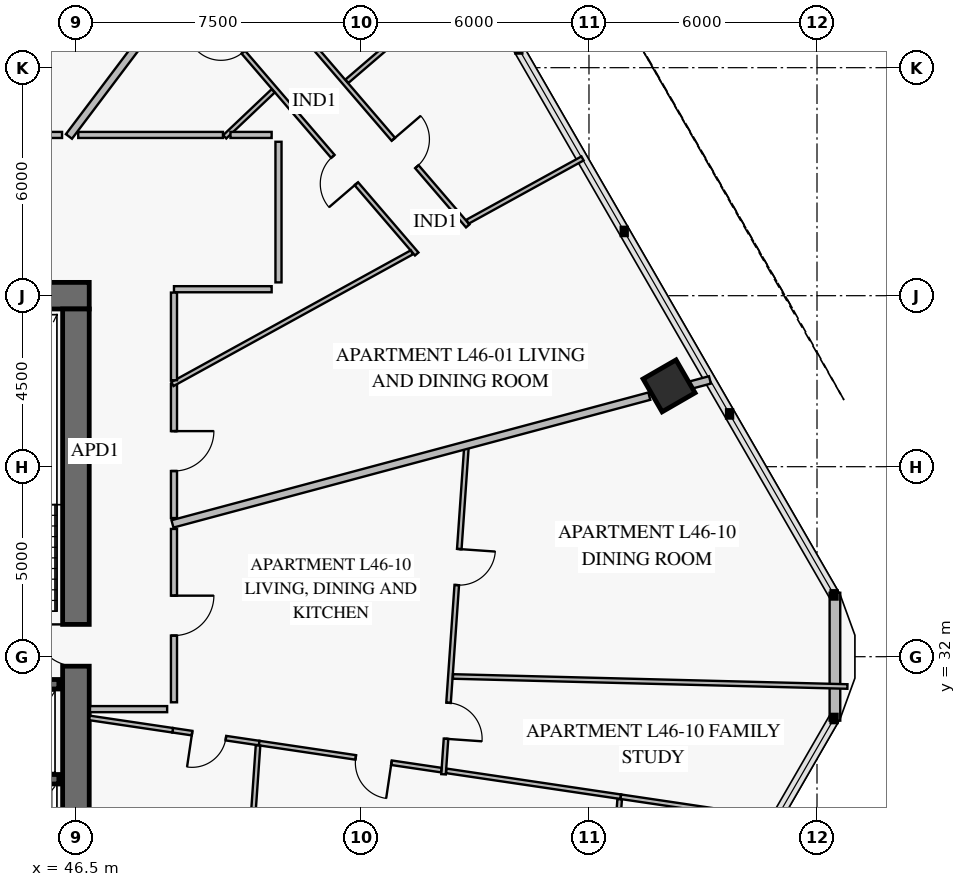
"""IFC4 building model, lengths in metres.
Left out: names, types, materials, properties, quantities, classifications, styles, units other than length and angle.
Written with IfcOpenShell. Run it as: python <this file> out.ifc"""

import sys

from ifc_helpers import new_model, si_unit, direction, frame, frame_2d, origin, origin_2d, place, context, subcontext, project, spatial, rectangle, extrude, element, fill, save


model = new_model("IFC4")
c1 = context("Model", 3, precision=1e-05, world=origin(), true_north=direction((0.0, 1.0)))
c2 = subcontext(c1, "Body", "Model", "MODEL_VIEW")
j1 = project(units=[si_unit("LENGTHUNIT", "METRE"), si_unit("PLANEANGLEUNIT", "RADIAN")], contexts=[c1])
p1 = place(None, origin())
s1 = spatial("IfcSite", under=j1, at=p1, CompositionType="ELEMENT")
p2 = place(p1, origin())
s2 = spatial("IfcBuilding", under=s1, at=p2, CompositionType="ELEMENT")
p3 = place(p2, frame((0.0, 0.0, 184.6)))
s3 = spatial("IfcBuildingStorey", under=s2, at=p3, CompositionType="ELEMENT", Elevation=184.6)
p4 = place(p3, frame((46.85, 41.5, 0.0), z_axis=(0.0, 0.0, 1.0), x_axis=(-1.0, 0.0, 0.0)))
e1 = element("IfcWall", 1, at=p4, inside=s3, PredefinedType="SHEAR", context=c2, shape_type="SweptSolid", body=[
    extrude(rectangle(XDim=7.9, YDim=0.7, at=frame_2d((3.95, 0.0))), origin(), (0.0, 0.0, 1.0), 3.8),
])
p5 = place(p3, frame((46.5, 22.85, 0.0), z_axis=(0.0, 0.0, 1.0), x_axis=(0.0, 1.0, 0.0)))
e2 = element("IfcWall", 2, at=p5, inside=s3, PredefinedType="SHEAR", context=c2, shape_type="SweptSolid", body=[
    extrude(rectangle(XDim=18.3, YDim=0.7, at=frame_2d((9.15, 0.0))), origin(), (0.0, 0.0, 1.0), 3.8),
])
p6 = place(p5, frame((8.9, 0.0, 0.0)))
e3 = element("IfcOpeningElement", 3, at=p6, cuts=e2, PredefinedType="OPENING", context=c2, shape_type="SweptSolid", body=[
    extrude(rectangle(XDim=1.1, YDim=2.15, at=frame_2d((0.55, 1.075))), frame((0.0, 0.362, 0.0), z_axis=(0.0, -1.0, 0.0), x_axis=(1.0, 0.0, 0.0)), (0.0, 0.0, 1.0), 0.724),
])
p7 = place(p3, frame((62.108, 39.126, 0.0), z_axis=(0.0, 0.0, 1.0), x_axis=(-0.5, 0.866025403784, 0.0)))
e4 = element("IfcColumn", 4, at=p7, inside=s3, PredefinedType="COLUMN", context=c2, shape_type="SweptSolid", body=[
    extrude(rectangle(XDim=1.0, YDim=1.0, at=origin_2d()), origin(), (0.0, 0.0, 1.0), 3.55),
])
p8 = place(p3, frame((66.472, 33.683, 0.0), z_axis=(0.0, 0.0, 1.0), x_axis=(0.0, -1.0, 0.0)))
e5 = element("IfcWall", 5, at=p8, inside=s3, PredefinedType="SOLIDWALL", context=c2, shape_type="SweptSolid", body=[
    extrude(rectangle(XDim=3.365, YDim=0.28, at=frame_2d((1.683, 0.0))), origin(), (0.0, 0.0, 1.0), 3.55),
])
p9 = place(p3, frame((25.95, 31.275, 0.0), z_axis=(0.0, 0.0, 1.0), x_axis=(1.0, 0.0, 0.0)))
e6 = element("IfcWall", 6, at=p9, inside=s3, PredefinedType="SOLIDWALL", context=c2, shape_type="SweptSolid", body=[
    extrude(rectangle(XDim=20.1, YDim=0.25, at=frame_2d((10.05, 0.0))), origin(), (0.0, 0.0, 1.0), 3.8),
])
p10 = place(p9, frame((2.6, 0.0, 0.0)))
e7 = element("IfcOpeningElement", 7, at=p10, cuts=e6, PredefinedType="OPENING", context=c2, shape_type="SweptSolid", body=[
    extrude(rectangle(XDim=1.1, YDim=2.15, at=frame_2d((0.55, 1.075))), frame((0.0, 0.137, 0.0), z_axis=(0.0, -1.0, 0.0), x_axis=(1.0, 0.0, 0.0)), (0.0, 0.0, 1.0), 0.274),
])
p11 = place(p9, frame((10.6, 0.0, 0.0)))
e8 = element("IfcOpeningElement", 8, at=p11, cuts=e6, PredefinedType="OPENING", context=c2, shape_type="SweptSolid", body=[
    extrude(rectangle(XDim=1.1, YDim=2.15, at=frame_2d((0.55, 1.075))), frame((0.0, 0.137, 0.0), z_axis=(0.0, -1.0, 0.0), x_axis=(1.0, 0.0, 0.0)), (0.0, 0.0, 1.0), 0.274),
])
p12 = place(p9, frame((16.35, 0.0, 0.0)))
e9 = element("IfcOpeningElement", 9, at=p12, cuts=e6, PredefinedType="OPENING", context=c2, shape_type="SweptSolid", body=[
    extrude(rectangle(XDim=1.1, YDim=2.15, at=frame_2d((0.55, 1.075))), frame((0.0, 0.137, 0.0), z_axis=(0.0, -1.0, 0.0), x_axis=(1.0, 0.0, 0.0)), (0.0, 0.0, 1.0), 0.274),
])
p13 = place(p3, frame((43.8, 28.775, 0.0), z_axis=(0.0, 0.0, 1.0), x_axis=(1.0, 0.0, 0.0)))
e10 = element("IfcWall", 10, at=p13, inside=s3, PredefinedType="SOLIDWALL", context=c2, shape_type="SweptSolid", body=[
    extrude(rectangle(XDim=2.25, YDim=0.25, at=frame_2d((1.125, 0.0))), origin(), (0.0, 0.0, 1.0), 3.8),
])
p14 = place(p3, frame((55.467, 42.597, 0.0), z_axis=(0.0, 0.0, 1.0), x_axis=(-0.651552756093, 0.758603325875, 0.0)))
e11 = element("IfcWall", 11, at=p14, inside=s3, PredefinedType="PARTITIONING", context=c2, shape_type="SweptSolid", body=[
    extrude(rectangle(XDim=9.291, YDim=0.12, at=frame_2d((4.646, 0.0))), origin(), (0.0, 0.0, 1.0), 2.9),
])
p15 = place(p14, frame((2.437, 0.0, 0.0)))
e12 = element("IfcOpeningElement", 12, at=p15, cuts=e11, PredefinedType="OPENING", context=c2, shape_type="SweptSolid", body=[
    extrude(rectangle(XDim=0.95, YDim=2.1, at=frame_2d((0.475, 1.05))), frame((0.0, 0.072, 0.0), z_axis=(0.0, -1.0, 0.0), x_axis=(1.0, 0.0, 0.0)), (0.0, 0.0, 1.0), 0.144),
])
p16 = place(p14, frame((7.005, 0.0, 0.0)))
e13 = element("IfcOpeningElement", 13, at=p16, cuts=e11, PredefinedType="OPENING", context=c2, shape_type="SweptSolid", body=[
    extrude(rectangle(XDim=0.9, YDim=2.1, at=frame_2d((0.45, 1.05))), frame((0.0, 0.072, 0.0), z_axis=(0.0, -1.0, 0.0), x_axis=(1.0, 0.0, 0.0)), (0.0, 0.0, 1.0), 0.144),
])
p17 = place(p3, frame((56.81, 43.336, 0.0), z_axis=(0.0, 0.0, 1.0), x_axis=(-0.651575392226, 0.75858388346, 0.0)))
e14 = element("IfcWall", 14, at=p17, inside=s3, PredefinedType="PARTITIONING", context=c2, shape_type="SweptSolid", body=[
    extrude(rectangle(XDim=9.92, YDim=0.12, at=frame_2d((4.96, 0.0))), origin(), (0.0, 0.0, 1.0), 2.9),
])
p18 = place(p17, frame((2.055, 0.0, 0.0)))
e15 = element("IfcOpeningElement", 15, at=p18, cuts=e14, PredefinedType="OPENING", context=c2, shape_type="SweptSolid", body=[
    extrude(rectangle(XDim=0.95, YDim=2.1, at=frame_2d((0.475, 1.05))), frame((0.0, 0.072, 0.0), z_axis=(0.0, -1.0, 0.0), x_axis=(1.0, 0.0, 0.0)), (0.0, 0.0, 1.0), 0.144),
])
p19 = place(p17, frame((6.915, 0.0, 0.0)))
e16 = element("IfcOpeningElement", 16, at=p19, cuts=e14, PredefinedType="OPENING", context=c2, shape_type="SweptSolid", body=[
    extrude(rectangle(XDim=0.95, YDim=2.1, at=frame_2d((0.475, 1.05))), frame((0.0, 0.072, 0.0), z_axis=(0.0, -1.0, 0.0), x_axis=(1.0, 0.0, 0.0)), (0.0, 0.0, 1.0), 0.144),
])
p20 = place(p3, frame((49.08, 35.648, 0.0), z_axis=(0.0, 0.0, 1.0), x_axis=(0.0, 1.0, 0.0)))
e17 = element("IfcWall", 17, at=p20, inside=s3, PredefinedType="PARTITIONING", context=c2, shape_type="SweptSolid", body=[
    extrude(rectangle(XDim=3.526, YDim=0.16, at=frame_2d((1.763, 0.0))), origin(), (0.0, 0.0, 1.0), 2.9),
])
p21 = place(p20, frame((1.238, 0.0, 0.0)))
e18 = element("IfcOpeningElement", 18, at=p21, cuts=e17, PredefinedType="OPENING", context=c2, shape_type="SweptSolid", body=[
    extrude(rectangle(XDim=1.05, YDim=2.15, at=frame_2d((0.525, 1.075))), frame((0.0, 0.092, 0.0), z_axis=(0.0, -1.0, 0.0), x_axis=(1.0, 0.0, 0.0)), (0.0, 0.0, 1.0), 0.184),
])
p22 = place(p3, frame((46.135, 45.73, 0.0), z_axis=(0.0, 0.0, 1.0), x_axis=(-1.0, 0.0, 0.0)))
e19 = element("IfcWall", 19, at=p22, inside=s3, PredefinedType="PARTITIONING", context=c2, shape_type="SweptSolid", body=[
    extrude(rectangle(XDim=4.234, YDim=0.16, at=frame_2d((2.117, 0.0))), origin(), (0.0, 0.0, 1.0), 3.55),
])
p23 = place(p22, frame((1.592, 0.0, 0.0)))
e20 = element("IfcOpeningElement", 20, at=p23, cuts=e19, PredefinedType="OPENING", context=c2, shape_type="SweptSolid", body=[
    extrude(rectangle(XDim=1.05, YDim=2.15, at=frame_2d((0.525, 1.075))), frame((0.0, 0.092, 0.0), z_axis=(0.0, -1.0, 0.0), x_axis=(1.0, 0.0, 0.0)), (0.0, 0.0, 1.0), 0.184),
])
p24 = place(p3, frame((56.173, 28.906, 0.0), z_axis=(0.0, 0.0, 1.0), x_axis=(0.069768607492, 0.997563201711, 0.0)))
e21 = element("IfcWall", 21, at=p24, inside=s3, PredefinedType="PARTITIONING", context=c2, shape_type="SweptSolid", body=[
    extrude(rectangle(XDim=8.591, YDim=0.12, at=frame_2d((4.295, 0.0))), origin(), (0.0, 0.0, 1.0), 3.55),
])
p25 = place(p24, frame((0.936, 0.0, 0.0)))
e22 = element("IfcOpeningElement", 22, at=p25, cuts=e21, PredefinedType="OPENING", context=c2, shape_type="SweptSolid", body=[
    extrude(rectangle(XDim=0.95, YDim=2.1, at=frame_2d((0.475, 1.05))), frame((0.0, 0.072, 0.0), z_axis=(0.0, -1.0, 0.0), x_axis=(1.0, 0.0, 0.0)), (0.0, 0.0, 1.0), 0.144),
])
p26 = place(p24, frame((4.991, 0.0, 0.0)))
e23 = element("IfcOpeningElement", 23, at=p26, cuts=e21, PredefinedType="OPENING", context=c2, shape_type="SweptSolid", body=[
    extrude(rectangle(XDim=0.95, YDim=2.1, at=frame_2d((0.475, 1.05))), frame((0.0, 0.072, 0.0), z_axis=(0.0, -1.0, 0.0), x_axis=(1.0, 0.0, 0.0)), (0.0, 0.0, 1.0), 0.144),
])
p27 = place(p3, frame((49.045, 30.064, 0.0), z_axis=(0.0, 0.0, 1.0), x_axis=(0.989173245812, -0.146752477897, 0.0)))
e24 = element("IfcWall", 24, at=p27, inside=s3, PredefinedType="PARTITIONING", context=c2, shape_type="SweptSolid", body=[
    extrude(rectangle(XDim=2.301, YDim=0.12, at=frame_2d((1.15, 0.0))), origin(), (0.0, 0.0, 1.0), 3.55),
])
p28 = place(p27, frame((0.516, 0.0, 0.0)))
e25 = element("IfcOpeningElement", 25, at=p28, cuts=e24, PredefinedType="OPENING", context=c2, shape_type="SweptSolid", body=[
    extrude(rectangle(XDim=0.9, YDim=2.1, at=frame_2d((0.45, 1.05))), frame((0.0, 0.072, 0.0), z_axis=(0.0, -1.0, 0.0), x_axis=(1.0, 0.0, 0.0)), (0.0, 0.0, 1.0), 0.144),
])
p29 = place(p3, frame((51.321, 29.727, 0.0), z_axis=(0.0, 0.0, 1.0), x_axis=(0.98916147346, -0.146831806573, 0.0)))
e26 = element("IfcWall", 26, at=p29, inside=s3, PredefinedType="PARTITIONING", context=c2, shape_type="SweptSolid", body=[
    extrude(rectangle(XDim=4.844, YDim=0.12, at=frame_2d((2.422, 0.0))), origin(), (0.0, 0.0, 1.0), 3.55),
])
p30 = place(p29, frame((2.569, 0.0, 0.0)))
e27 = element("IfcOpeningElement", 27, at=p30, cuts=e26, PredefinedType="OPENING", context=c2, shape_type="SweptSolid", body=[
    extrude(rectangle(XDim=0.95, YDim=2.1, at=frame_2d((0.475, 1.05))), frame((0.0, 0.072, 0.0), z_axis=(0.0, -1.0, 0.0), x_axis=(1.0, 0.0, 0.0)), (0.0, 0.0, 1.0), 0.144),
])
p31 = place(p3, frame((56.247, 28.996, 0.0), z_axis=(0.0, 0.0, 1.0), x_axis=(0.989173212218, -0.146752704339, 0.0)))
e28 = element("IfcWall", 28, at=p31, inside=s3, PredefinedType="PARTITIONING", context=c2, shape_type="SweptSolid", body=[
    extrude(rectangle(XDim=4.64, YDim=0.12, at=frame_2d((2.32, 0.0))), origin(), (0.0, 0.0, 1.0), 3.55),
])
p32 = place(p3, frame((60.356, 21.803, 0.0), z_axis=(0.0, 0.0, 1.0), x_axis=(0.069770485872, 0.997563070337, 0.0)))
e29 = element("IfcWall", 29, at=p32, inside=s3, PredefinedType="PARTITIONING", context=c2, shape_type="SweptSolid", body=[
    extrude(rectangle(XDim=6.463, YDim=0.12, at=frame_2d((3.231, 0.0))), origin(), (0.0, 0.0, 1.0), 2.87),
])
p33 = place(p32, frame((4.055, 0.0, 0.0)))
e30 = element("IfcOpeningElement", 30, at=p33, cuts=e29, PredefinedType="OPENING", context=c2, shape_type="SweptSolid", body=[
    extrude(rectangle(XDim=0.95, YDim=2.1, at=frame_2d((0.475, 1.05))), frame((0.0, 0.072, 0.0), z_axis=(0.0, -1.0, 0.0), x_axis=(1.0, 0.0, 0.0)), (0.0, 0.0, 1.0), 0.144),
])
p34 = place(p3, frame((49.08, 30.8, 0.0), z_axis=(0.0, 0.0, 1.0), x_axis=(0.0, 1.0, 0.0)))
e31 = element("IfcWall", 31, at=p34, inside=s3, PredefinedType="PARTITIONING", context=c2, shape_type="SweptSolid", body=[
    extrude(rectangle(XDim=4.562, YDim=0.16, at=frame_2d((2.281, 0.0))), origin(), (0.0, 0.0, 1.0), 3.55),
])
p35 = place(p34, frame((1.756, 0.0, 0.0)))
e32 = element("IfcOpeningElement", 32, at=p35, cuts=e31, PredefinedType="OPENING", context=c2, shape_type="SweptSolid", body=[
    extrude(rectangle(XDim=1.05, YDim=2.15, at=frame_2d((0.525, 1.075))), frame((0.0, 0.092, 0.0), z_axis=(0.0, -1.0, 0.0), x_axis=(1.0, 0.0, 0.0)), (0.0, 0.0, 1.0), 0.184),
])
p36 = place(p3, frame((49.04, 35.494, 0.0), z_axis=(0.0, 0.0, 1.0), x_axis=(0.965926995019, 0.258814683304, 0.0)))
e33 = element("IfcWall", 33, at=p36, inside=s3, PredefinedType="PARTITIONING", context=c2, shape_type="SweptSolid", body=[
    extrude(rectangle(XDim=12.99, YDim=0.2, at=frame_2d((6.495, 0.0))), origin(), (0.0, 0.0, 1.0), 2.9),
])
p37 = place(p3, frame((62.628, 39.135, 0.0), z_axis=(0.0, 0.0, 1.0), x_axis=(0.965881701481, 0.258983665013, 0.0)))
e34 = element("IfcWall", 34, at=p37, inside=s3, PredefinedType="PARTITIONING", context=c2, shape_type="SweptSolid", body=[
    extrude(rectangle(XDim=0.575, YDim=0.2, at=frame_2d((0.288, 0.0))), origin(), (0.0, 0.0, 1.0), 3.55),
])
p38 = place(p3, frame((50.415, 45.68, 0.0), z_axis=(0.0, 0.0, 1.0), x_axis=(0.725405017461, 0.688322279635, 0.0)))
e35 = element("IfcWall", 35, at=p38, inside=s3, PredefinedType="PARTITIONING", context=c2, shape_type="SweptSolid", body=[
    extrude(rectangle(XDim=1.758, YDim=0.12, at=frame_2d((0.879, 0.0))), origin(), (0.0, 0.0, 1.0), 3.15),
])
p39 = place(p3, frame((53.63, 47.143, 0.0), z_axis=(0.0, 0.0, 1.0), x_axis=(0.758610544746, 0.651544351062, 0.0)))
e36 = element("IfcWall", 36, at=p39, inside=s3, PredefinedType="PARTITIONING", context=c2, shape_type="SweptSolid", body=[
    extrude(rectangle(XDim=4.431, YDim=0.12, at=frame_2d((2.215, 0.0))), origin(), (0.0, 0.0, 1.0), 2.87),
])
p40 = place(p3, frame((49.038, 39.174, 0.0), z_axis=(0.0, 0.0, 1.0), x_axis=(0.876137059661, 0.482062083853, 0.0)))
e37 = element("IfcWall", 37, at=p40, inside=s3, PredefinedType="PARTITIONING", context=c2, shape_type="SweptSolid", body=[
    extrude(rectangle(XDim=7.192, YDim=0.12, at=frame_2d((3.596, 0.0))), origin(), (0.0, 0.0, 1.0), 3.15),
])
p41 = place(p3, frame((56.804, 43.447, 0.0), z_axis=(0.0, 0.0, 1.0), x_axis=(0.876100956411, 0.482127694886, 0.0)))
e38 = element("IfcWall", 38, at=p41, inside=s3, PredefinedType="PARTITIONING", context=c2, shape_type="SweptSolid", body=[
    extrude(rectangle(XDim=3.454, YDim=0.12, at=frame_2d((1.727, 0.0))), origin(), (0.0, 0.0, 1.0), 2.87),
])
p42 = place(p3, frame((46.316, 45.69, 0.0), z_axis=(0.0, 0.0, 1.0), x_axis=(0.601811441108, 0.798638209299, 0.0)))
e39 = element("IfcWall", 39, at=p42, inside=s3, PredefinedType="PARTITIONING", context=c2, shape_type="SweptSolid", body=[
    extrude(rectangle(XDim=12.389, YDim=0.2, at=frame_2d((6.194, 0.0))), origin(), (0.0, 0.0, 1.0), 2.87),
])
p43 = place(p3, frame((56.421, 31.48, 0.0), z_axis=(0.0, 0.0, 1.0), x_axis=(0.999675097587, -0.025489198988, 0.0)))
e40 = element("IfcWall", 40, at=p43, inside=s3, PredefinedType="PARTITIONING", context=c2, shape_type="SweptSolid", body=[
    extrude(rectangle(XDim=10.383, YDim=0.12, at=frame_2d((5.191, 0.0))), origin(), (0.0, 0.0, 1.0), 2.87),
])
p44 = place(p3, frame((46.858, 30.389, 0.0), z_axis=(0.0, 0.0, 1.0), x_axis=(0.989161931015, -0.146828724135, 0.0)))
e41 = element("IfcWall", 41, at=p44, inside=s3, PredefinedType="PARTITIONING", context=c2, shape_type="SweptSolid", body=[
    extrude(rectangle(XDim=2.211, YDim=0.12, at=frame_2d((1.106, 0.0))), origin(), (0.0, 0.0, 1.0), 3.55),
])
p45 = place(p3, frame((60.837, 28.315, 0.0), z_axis=(0.0, 0.0, 1.0), x_axis=(0.989174828163, -0.146741811793, 0.0)))
e42 = element("IfcWall", 42, at=p45, inside=s3, PredefinedType="PARTITIONING", context=c2, shape_type="SweptSolid", body=[
    extrude(rectangle(XDim=4.123, YDim=0.12, at=frame_2d((2.062, 0.0))), origin(), (0.0, 0.0, 1.0), 2.87),
])
p46 = place(p3, frame((51.018, 25.743, 0.0), z_axis=(0.0, 0.0, 1.0), x_axis=(0.069719060605, 0.997566665736, 0.0)))
e43 = element("IfcWall", 43, at=p46, inside=s3, PredefinedType="PARTITIONING", context=c2, shape_type="SweptSolid", body=[
    extrude(rectangle(XDim=3.929, YDim=0.12, at=frame_2d((1.964, 0.0))), origin(), (0.0, 0.0, 1.0), 2.9),
])
p47 = place(p3, frame((51.83, 41.85, 0.0), z_axis=(0.0, 0.0, 1.0), x_axis=(0.0, 1.0, 0.0)))
e44 = element("IfcWall", 44, at=p47, inside=s3, PredefinedType="PARTITIONING", context=c2, shape_type="SweptSolid", body=[
    extrude(rectangle(XDim=3.7, YDim=0.16, at=frame_2d((1.85, 0.0))), origin(), (0.0, 0.0, 1.0), 3.15),
])
p48 = place(p3, frame((49.08, 41.67, 0.0), z_axis=(0.0, 0.0, 1.0), x_axis=(1.0, 0.0, 0.0)))
e45 = element("IfcWall", 45, at=p48, inside=s3, PredefinedType="PARTITIONING", context=c2, shape_type="SweptSolid", body=[
    extrude(rectangle(XDim=2.57, YDim=0.16, at=frame_2d((1.285, 0.0))), origin(), (0.0, 0.0, 1.0), 3.55),
])
p49 = place(p3, frame((49.08, 39.274, 0.0), z_axis=(0.0, 0.0, 1.0), x_axis=(0.0, 1.0, 0.0)))
e46 = element("IfcWall", 46, at=p49, inside=s3, PredefinedType="PARTITIONING", context=c2, shape_type="SweptSolid", body=[
    extrude(rectangle(XDim=2.308, YDim=0.16, at=frame_2d((1.154, 0.0))), origin(), (0.0, 0.0, 1.0), 3.55),
])
p50 = place(p3, frame((51.65, 45.73, 0.0), z_axis=(0.0, 0.0, 1.0), x_axis=(-1.0, 0.0, 0.0)))
e47 = element("IfcWall", 47, at=p50, inside=s3, PredefinedType="PARTITIONING", context=c2, shape_type="SweptSolid", body=[
    extrude(rectangle(XDim=1.083, YDim=0.16, at=frame_2d((0.542, 0.0))), origin(), (0.0, 0.0, 1.0), 3.15),
])
p51 = place(p3, frame((50.369, 45.73, 0.0), z_axis=(0.0, 0.0, 1.0), x_axis=(-1.0, 0.0, 0.0)))
e48 = element("IfcWall", 48, at=p51, inside=s3, PredefinedType="PARTITIONING", context=c2, shape_type="SweptSolid", body=[
    extrude(rectangle(XDim=3.808, YDim=0.16, at=frame_2d((1.904, 0.0))), origin(), (0.0, 0.0, 1.0), 2.9),
])
p52 = place(p3, frame((46.87, 30.62, 0.0), z_axis=(0.0, 0.0, 1.0), x_axis=(1.0, 0.0, 0.0)))
e49 = element("IfcWall", 49, at=p52, inside=s3, PredefinedType="PARTITIONING", context=c2, shape_type="SweptSolid", body=[
    extrude(rectangle(XDim=2.03, YDim=0.16, at=frame_2d((1.015, 0.0))), origin(), (0.0, 0.0, 1.0), 3.55),
])
p53 = place(p6, origin())
e50 = element("IfcDoor", 50, at=p53, inside=s3, OperationType="SINGLE_SWING_RIGHT", PredefinedType="USERDEFINED", context=c2, shape_type="SweptSolid", body=[
    extrude(rectangle(XDim=1.1, YDim=2.15, at=frame_2d((0.55, 1.075))), frame((0.0, 0.025, 0.0), z_axis=(0.0, -1.0, 0.0), x_axis=(1.0, 0.0, 0.0)), (0.0, 0.0, 1.0), 0.05),
])
fill(e3, e50)
p54 = place(p15, origin())
e51 = element("IfcDoor", 51, at=p54, inside=s3, OperationType="SINGLE_SWING_LEFT", PredefinedType="DOOR", context=c2, shape_type="SweptSolid", body=[
    extrude(rectangle(XDim=0.95, YDim=2.1, at=frame_2d((0.475, 1.05))), frame((0.0, 0.025, 0.0), z_axis=(0.0, -1.0, 0.0), x_axis=(1.0, 0.0, 0.0)), (0.0, 0.0, 1.0), 0.05),
])
fill(e12, e51)
p55 = place(p16, origin())
e52 = element("IfcDoor", 52, at=p55, inside=s3, OperationType="SINGLE_SWING_RIGHT", PredefinedType="DOOR", context=c2, shape_type="SweptSolid", body=[
    extrude(rectangle(XDim=0.9, YDim=2.1, at=frame_2d((0.45, 1.05))), frame((0.0, 0.025, 0.0), z_axis=(0.0, -1.0, 0.0), x_axis=(1.0, 0.0, 0.0)), (0.0, 0.0, 1.0), 0.05),
])
fill(e13, e52)
p56 = place(p18, frame((0.95, 0.0, 0.0), z_axis=(0.0, 0.0, 1.0), x_axis=(-1.0, 0.0, 0.0)))
e53 = element("IfcDoor", 53, at=p56, inside=s3, OperationType="SINGLE_SWING_LEFT", PredefinedType="DOOR", context=c2, shape_type="SweptSolid", body=[
    extrude(rectangle(XDim=0.95, YDim=2.1, at=frame_2d((0.475, 1.05))), frame((0.0, 0.025, 0.0), z_axis=(0.0, -1.0, 0.0), x_axis=(1.0, 0.0, 0.0)), (0.0, 0.0, 1.0), 0.05),
])
fill(e15, e53)
p57 = place(p21, frame((1.05, 0.0, 0.0), z_axis=(0.0, 0.0, 1.0), x_axis=(-1.0, 0.0, 0.0)))
e54 = element("IfcDoor", 54, at=p57, inside=s3, OperationType="SINGLE_SWING_LEFT", PredefinedType="DOOR", context=c2, shape_type="SweptSolid", body=[
    extrude(rectangle(XDim=1.05, YDim=2.15, at=frame_2d((0.525, 1.075))), frame((0.0, 0.025, 0.0), z_axis=(0.0, -1.0, 0.0), x_axis=(1.0, 0.0, 0.0)), (0.0, 0.0, 1.0), 0.05),
])
fill(e18, e54)
p58 = place(p25, frame((0.95, 0.0, 0.0), z_axis=(0.0, 0.0, 1.0), x_axis=(-1.0, 0.0, 0.0)))
e55 = element("IfcDoor", 55, at=p58, inside=s3, OperationType="SINGLE_SWING_RIGHT", PredefinedType="DOOR", context=c2, shape_type="SweptSolid", body=[
    extrude(rectangle(XDim=0.95, YDim=2.1, at=frame_2d((0.475, 1.05))), frame((0.0, 0.025, 0.0), z_axis=(0.0, -1.0, 0.0), x_axis=(1.0, 0.0, 0.0)), (0.0, 0.0, 1.0), 0.05),
])
fill(e22, e55)
p59 = place(p26, frame((0.95, 0.0, 0.0), z_axis=(0.0, 0.0, 1.0), x_axis=(-1.0, 0.0, 0.0)))
e56 = element("IfcDoor", 56, at=p59, inside=s3, OperationType="SINGLE_SWING_LEFT", PredefinedType="DOOR", context=c2, shape_type="SweptSolid", body=[
    extrude(rectangle(XDim=0.95, YDim=2.1, at=frame_2d((0.475, 1.05))), frame((0.0, 0.025, 0.0), z_axis=(0.0, -1.0, 0.0), x_axis=(1.0, 0.0, 0.0)), (0.0, 0.0, 1.0), 0.05),
])
fill(e23, e56)
p60 = place(p28, frame((0.9, 0.0, 0.0), z_axis=(0.0, 0.0, 1.0), x_axis=(-1.0, 0.0, 0.0)))
e57 = element("IfcDoor", 57, at=p60, inside=s3, OperationType="SINGLE_SWING_RIGHT", PredefinedType="DOOR", context=c2, shape_type="SweptSolid", body=[
    extrude(rectangle(XDim=0.9, YDim=2.1, at=frame_2d((0.45, 1.05))), frame((0.0, 0.025, 0.0), z_axis=(0.0, -1.0, 0.0), x_axis=(1.0, 0.0, 0.0)), (0.0, 0.0, 1.0), 0.05),
])
fill(e25, e57)
p61 = place(p30, frame((0.95, 0.0, 0.0), z_axis=(0.0, 0.0, 1.0), x_axis=(-1.0, 0.0, 0.0)))
e58 = element("IfcDoor", 58, at=p61, inside=s3, OperationType="SINGLE_SWING_LEFT", PredefinedType="DOOR", context=c2, shape_type="SweptSolid", body=[
    extrude(rectangle(XDim=0.95, YDim=2.1, at=frame_2d((0.475, 1.05))), frame((0.0, 0.025, 0.0), z_axis=(0.0, -1.0, 0.0), x_axis=(1.0, 0.0, 0.0)), (0.0, 0.0, 1.0), 0.05),
])
fill(e27, e58)
p62 = place(p35, frame((1.05, 0.0, 0.0), z_axis=(0.0, 0.0, 1.0), x_axis=(-1.0, 0.0, 0.0)))
e59 = element("IfcDoor", 59, at=p62, inside=s3, OperationType="SINGLE_SWING_LEFT", PredefinedType="DOOR", context=c2, shape_type="SweptSolid", body=[
    extrude(rectangle(XDim=1.05, YDim=2.15, at=frame_2d((0.525, 1.075))), frame((0.0, 0.025, 0.0), z_axis=(0.0, -1.0, 0.0), x_axis=(1.0, 0.0, 0.0)), (0.0, 0.0, 1.0), 0.05),
])
fill(e32, e59)
save(model, sys.argv[1])
